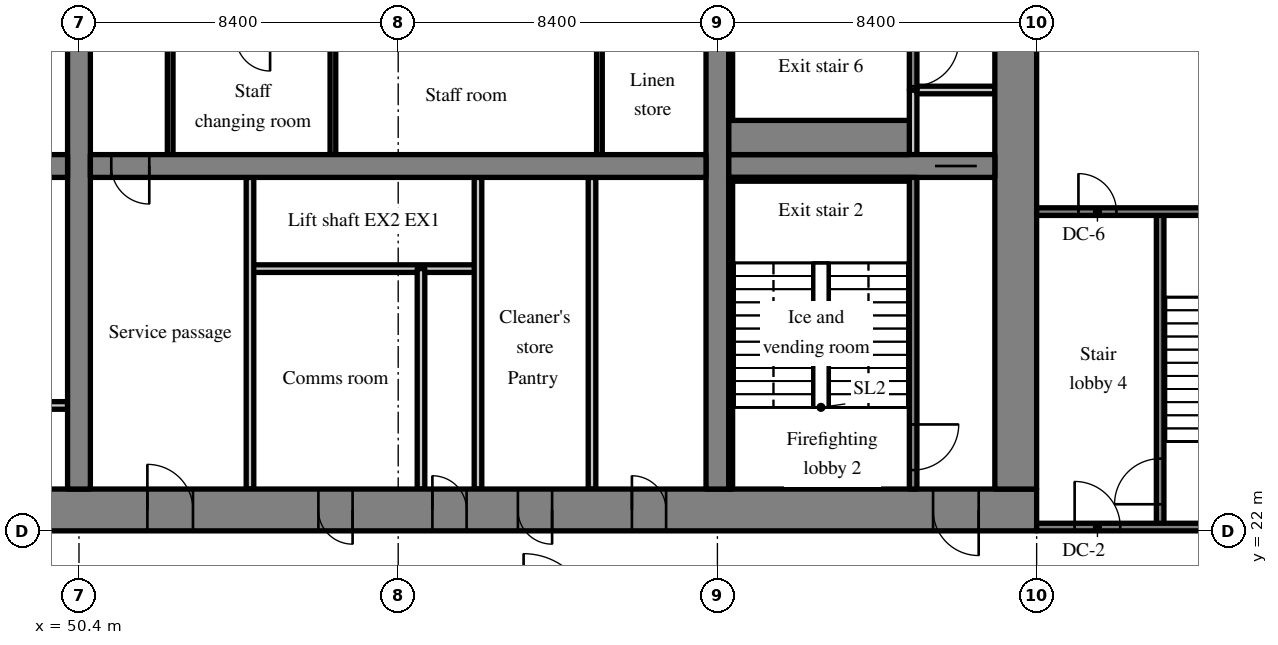
"""IFC4 building model, lengths in metres.
Left out: names, types, materials, properties, quantities, classifications, styles, units other than length and angle.
Written with IfcOpenShell. Run it as: python <this file> out.ifc"""

import sys

from ifc_helpers import new_model, si_unit, direction, frame, frame_2d, origin, place, context, subcontext, project, spatial, rectangle, extrude, source, transform, mapped, element, fill, save


model = new_model("IFC4")
c1 = context("Model", 3, precision=1e-05, world=origin(), true_north=direction((0.0, 1.0)))
c2 = subcontext(c1, "Body", "Model", "MODEL_VIEW")
j1 = project(units=[si_unit("LENGTHUNIT", "METRE"), si_unit("PLANEANGLEUNIT", "RADIAN")], contexts=[c1])
p1 = place(None, origin())
s1 = spatial("IfcSite", under=j1, at=p1, CompositionType="ELEMENT")
p2 = place(p1, origin())
s2 = spatial("IfcBuilding", under=s1, at=p2, CompositionType="ELEMENT")
p3 = place(p2, frame((0.0, 0.0, 11.4)))
s3 = spatial("IfcBuildingStorey", under=s2, at=p3, CompositionType="ELEMENT", Elevation=11.4)
m1 = source(origin(), c2, "Body", "SweptSolid", [
    extrude(rectangle(XDim=50.4, YDim=1.1, at=frame_2d((25.2, 0.0))), origin(), (0.0, 0.0, 1.0), 6.32),
])
p4 = place(p3, frame((25.2, 22.55, 0.0), z_axis=(0.0, 0.0, 1.0), x_axis=(1.0, 0.0, 0.0)))
e1 = element("IfcWall", 1, at=p4, inside=s3, PredefinedType="SHEAR", context=c2, shape_type="MappedRepresentation", body=[
    mapped(m1, transform((0.0, 0.0, 0.0), scale=1.0)),
])
m2 = source(origin(), c2, "Body", "SweptSolid", [
    extrude(rectangle(XDim=1.8, YDim=2.1, at=frame_2d((0.9, 1.05))), frame((0.0, 0.56, 0.0), z_axis=(0.0, -1.0, 0.0), x_axis=(1.0, 0.0, 0.0)), (0.0, 0.0, 1.0), 1.12),
])
p5 = place(p4, frame((15.9, 0.0, 0.0)))
e2 = element("IfcOpeningElement", 2, at=p5, cuts=e1, PredefinedType="OPENING", context=c2, shape_type="MappedRepresentation", body=[
    mapped(m2, transform((0.0, 0.0, 0.0), scale=1.0)),
])
m3 = source(origin(), c2, "Body", "SweptSolid", [
    extrude(rectangle(XDim=1.2, YDim=2.1, at=frame_2d((0.6, 1.05))), frame((0.0, 0.56, 0.0), z_axis=(0.0, -1.0, 0.0), x_axis=(1.0, 0.0, 0.0)), (0.0, 0.0, 1.0), 1.12),
])
p6 = place(p4, frame((27.0, 0.0, 0.0)))
e3 = element("IfcOpeningElement", 3, at=p6, cuts=e1, PredefinedType="OPENING", context=c2, shape_type="MappedRepresentation", body=[
    mapped(m3, transform((0.0, 0.0, 0.0), scale=1.0)),
])
m4 = source(origin(), c2, "Body", "SweptSolid", [
    extrude(rectangle(XDim=0.9, YDim=2.1, at=frame_2d((0.45, 1.05))), frame((0.0, 0.56, 0.0), z_axis=(0.0, -1.0, 0.0), x_axis=(1.0, 0.0, 0.0)), (0.0, 0.0, 1.0), 1.12),
])
p7 = place(p4, frame((34.5, 0.0, 0.0)))
e4 = element("IfcOpeningElement", 4, at=p7, cuts=e1, PredefinedType="OPENING", context=c2, shape_type="MappedRepresentation", body=[
    mapped(m4, transform((0.0, 0.0, 0.0), scale=1.0)),
])
p8 = place(p4, frame((31.5, 0.0, 0.0)))
e5 = element("IfcOpeningElement", 5, at=p8, cuts=e1, PredefinedType="OPENING", context=c2, shape_type="MappedRepresentation", body=[
    mapped(m4, transform((0.0, 0.0, 0.0), scale=1.0)),
])
p9 = place(p4, frame((39.75, 0.0, 0.0)))
e6 = element("IfcOpeningElement", 6, at=p9, cuts=e1, PredefinedType="OPENING", context=c2, shape_type="MappedRepresentation", body=[
    mapped(m4, transform((0.0, 0.0, 0.0), scale=1.0)),
])
p10 = place(p4, frame((36.75, 0.0, 0.0)))
e7 = element("IfcOpeningElement", 7, at=p10, cuts=e1, PredefinedType="OPENING", context=c2, shape_type="MappedRepresentation", body=[
    mapped(m4, transform((0.0, 0.0, 0.0), scale=1.0)),
])
p11 = place(p4, frame((6.425, 0.0, 0.0)))
e8 = element("IfcOpeningElement", 8, at=p11, cuts=e1, PredefinedType="OPENING", context=c2, shape_type="MappedRepresentation", body=[
    mapped(m3, transform((0.0, 0.0, 0.0), scale=1.0)),
])
p12 = place(p4, frame((47.675, 0.0, 0.0)))
e9 = element("IfcOpeningElement", 9, at=p12, cuts=e1, PredefinedType="OPENING", context=c2, shape_type="MappedRepresentation", body=[
    mapped(m3, transform((0.0, 0.0, 0.0), scale=1.0)),
])
m5 = source(origin(), c2, "Body", "SweptSolid", [
    extrude(rectangle(XDim=17.8, YDim=1.1, at=frame_2d((8.9, 0.0))), origin(), (0.0, 0.0, 1.0), 6.32),
])
p13 = place(p3, frame((75.05, 23.1, 0.0), z_axis=(0.0, 0.0, 1.0), x_axis=(0.0, 1.0, 0.0)))
e10 = element("IfcWall", 10, at=p13, inside=s3, PredefinedType="SHEAR", context=c2, shape_type="MappedRepresentation", body=[
    mapped(m5, transform((0.0, 0.0, 0.0), scale=1.0)),
])
p14 = place(p13, frame((12.3, 0.0, 0.0)))
e11 = element("IfcOpeningElement", 11, at=p14, cuts=e10, PredefinedType="OPENING", context=c2, shape_type="MappedRepresentation", body=[
    mapped(m3, transform((0.0, 0.0, 0.0), scale=1.0)),
])
m6 = source(origin(), c2, "Body", "SweptSolid", [
    extrude(rectangle(XDim=17.8, YDim=0.6, at=frame_2d((8.9, 0.0))), origin(), (0.0, 0.0, 1.0), 6.32),
])
p15 = place(p3, frame((50.4, 23.1, 0.0), z_axis=(0.0, 0.0, 1.0), x_axis=(0.0, 1.0, 0.0)))
e12 = element("IfcWall", 12, at=p15, inside=s3, PredefinedType="SHEAR", context=c2, shape_type="MappedRepresentation", body=[
    mapped(m6, transform((0.0, 0.0, 0.0), scale=1.0)),
])
m7 = source(origin(), c2, "Body", "SweptSolid", [
    extrude(rectangle(XDim=1.1, YDim=2.1, at=frame_2d((0.55, 1.05))), frame((0.0, 0.31, 0.0), z_axis=(0.0, -1.0, 0.0), x_axis=(1.0, 0.0, 0.0)), (0.0, 0.0, 1.0), 0.62),
])
p16 = place(p15, frame((12.35, 0.0, 0.0)))
e13 = element("IfcOpeningElement", 13, at=p16, cuts=e12, PredefinedType="OPENING", context=c2, shape_type="MappedRepresentation", body=[
    mapped(m7, transform((0.0, 0.0, 0.0), scale=1.0)),
])
p17 = place(p3, frame((67.2, 23.1, 0.0), z_axis=(0.0, 0.0, 1.0), x_axis=(0.0, 1.0, 0.0)))
e14 = element("IfcWall", 14, at=p17, inside=s3, PredefinedType="SHEAR", context=c2, shape_type="MappedRepresentation", body=[
    mapped(m6, transform((0.0, 0.0, 0.0), scale=1.0)),
])
m8 = source(origin(), c2, "Body", "SweptSolid", [
    extrude(rectangle(XDim=16.2, YDim=0.6, at=frame_2d((8.1, 0.0))), origin(), (0.0, 0.0, 1.0), 6.32),
])
p18 = place(p3, frame((33.9, 31.6, 0.0), z_axis=(0.0, 0.0, 1.0), x_axis=(1.0, 0.0, 0.0)))
e15 = element("IfcWall", 15, at=p18, inside=s3, PredefinedType="SHEAR", context=c2, shape_type="MappedRepresentation", body=[
    mapped(m8, transform((0.0, 0.0, 0.0), scale=1.0)),
])
m9 = source(origin(), c2, "Body", "SweptSolid", [
    extrude(rectangle(XDim=1.0, YDim=2.1, at=frame_2d((0.5, 1.05))), frame((0.0, 0.31, 0.0), z_axis=(0.0, -1.0, 0.0), x_axis=(1.0, 0.0, 0.0)), (0.0, 0.0, 1.0), 0.62),
])
p19 = place(p18, frame((14.65, 0.0, 0.0)))
e16 = element("IfcOpeningElement", 16, at=p19, cuts=e15, PredefinedType="OPENING", context=c2, shape_type="MappedRepresentation", body=[
    mapped(m9, transform((0.0, 0.0, 0.0), scale=1.0)),
])
m10 = source(origin(), c2, "Body", "SweptSolid", [
    extrude(rectangle(XDim=16.2, YDim=0.6, at=frame_2d((8.1, 0.0))), origin(), (0.0, 0.0, 1.0), 6.32),
])
p20 = place(p3, frame((50.7, 31.6, 0.0), z_axis=(0.0, 0.0, 1.0), x_axis=(1.0, 0.0, 0.0)))
e17 = element("IfcWall", 17, at=p20, inside=s3, PredefinedType="SHEAR", context=c2, shape_type="MappedRepresentation", body=[
    mapped(m10, transform((0.0, 0.0, 0.0), scale=1.0)),
])
p21 = place(p20, frame((0.55, 0.0, 0.0)))
e18 = element("IfcOpeningElement", 18, at=p21, cuts=e17, PredefinedType="OPENING", context=c2, shape_type="MappedRepresentation", body=[
    mapped(m9, transform((0.0, 0.0, 0.0), scale=1.0)),
])
m11 = source(origin(), c2, "Body", "SweptSolid", [
    extrude(rectangle(XDim=7.0, YDim=0.6, at=frame_2d((3.5, 0.0))), origin(), (0.0, 0.0, 1.0), 6.32),
])
p22 = place(p3, frame((67.5, 31.6, 0.0), z_axis=(0.0, 0.0, 1.0), x_axis=(1.0, 0.0, 0.0)))
e19 = element("IfcWall", 19, at=p22, inside=s3, PredefinedType="SHEAR", context=c2, shape_type="MappedRepresentation", body=[
    mapped(m11, transform((0.0, 0.0, 0.0), scale=1.0)),
])
p23 = place(p22, frame((5.425, 0.0, 0.0)))
e20 = element("IfcOpeningElement", 20, at=p23, cuts=e19, PredefinedType="OPENING", context=c2, shape_type="MappedRepresentation", body=[
    mapped(m7, transform((0.0, 0.0, 0.0), scale=1.0)),
])
m12 = source(origin(), c2, "Body", "SweptSolid", [
    extrude(rectangle(XDim=6.0, YDim=0.2, at=frame_2d((3.0, 0.0))), origin(), (0.0, 0.0, 1.0), 6.32),
])
p24 = place(p3, frame((44.1, 25.3, 0.0), z_axis=(0.0, 0.0, 1.0), x_axis=(1.0, 0.0, 0.0)))
e21 = element("IfcWall", 21, at=p24, inside=s3, PredefinedType="SOLIDWALL", context=c2, shape_type="MappedRepresentation", body=[
    mapped(m12, transform((0.0, 0.0, 0.0), scale=1.0)),
])
m13 = source(origin(), c2, "Body", "SweptSolid", [
    extrude(rectangle(XDim=1.1, YDim=2.1, at=frame_2d((0.55, 1.05))), frame((0.0, 0.11, 0.0), z_axis=(0.0, -1.0, 0.0), x_axis=(1.0, 0.0, 0.0)), (0.0, 0.0, 1.0), 0.22),
])
p25 = place(p24, frame((0.95, 0.0, 0.0)))
e22 = element("IfcOpeningElement", 22, at=p25, cuts=e21, PredefinedType="OPENING", context=c2, shape_type="MappedRepresentation", body=[
    mapped(m13, transform((0.0, 0.0, 0.0), scale=1.0)),
])
p26 = place(p24, frame((3.95, 0.0, 0.0)))
e23 = element("IfcOpeningElement", 23, at=p26, cuts=e21, PredefinedType="OPENING", context=c2, shape_type="MappedRepresentation", body=[
    mapped(m13, transform((0.0, 0.0, 0.0), scale=1.0)),
])
p27 = place(p3, frame((60.9, 28.9, 0.0), z_axis=(0.0, 0.0, 1.0), x_axis=(-1.0, 0.0, 0.0)))
e24 = element("IfcWall", 24, at=p27, inside=s3, PredefinedType="SOLIDWALL", context=c2, shape_type="MappedRepresentation", body=[
    mapped(m12, transform((0.0, 0.0, 0.0), scale=1.0)),
])
m14 = source(origin(), c2, "Body", "SweptSolid", [
    extrude(rectangle(XDim=8.2, YDim=0.2, at=frame_2d((4.1, 0.0))), origin(), (0.0, 0.0, 1.0), 6.32),
])
for number, where, z_axis, x_axis in (
    (25, (54.9, 23.1, 0.0), (0.0, 0.0, 1.0), (0.0, 1.0, 0.0)),
    (26, (60.9, 23.1, 0.0), (0.0, 0.0, 1.0), (0.0, 1.0, 0.0)),
):
    element("IfcWall", number, at=place(p3, frame(where, z_axis=z_axis, x_axis=x_axis)), inside=s3, PredefinedType="PARTITIONING", context=c2, shape_type="MappedRepresentation", body=[
        mapped(m14, transform((0.0, 0.0, 0.0), scale=1.0)),
    ])
m15 = source(origin(), c2, "Body", "SweptSolid", [
    extrude(rectangle(XDim=5.8, YDim=0.2, at=frame_2d((2.9, 0.0))), origin(), (0.0, 0.0, 1.0), 6.32),
])
p28 = place(p3, frame((59.4, 23.1, 0.0), z_axis=(0.0, 0.0, 1.0), x_axis=(0.0, 1.0, 0.0)))
e27 = element("IfcWall", 27, at=p28, inside=s3, PredefinedType="PARTITIONING", context=c2, shape_type="MappedRepresentation", body=[
    mapped(m15, transform((0.0, 0.0, 0.0), scale=1.0)),
])
p29 = place(p3, frame((63.9, 23.1, 0.0), z_axis=(0.0, 0.0, 1.0), x_axis=(0.0, 1.0, 0.0)))
e28 = element("IfcWall", 28, at=p29, inside=s3, PredefinedType="PARTITIONING", context=c2, shape_type="MappedRepresentation", body=[
    mapped(m14, transform((0.0, 0.0, 0.0), scale=1.0)),
])
m16 = source(origin(), c2, "Body", "SweptSolid", [
    extrude(rectangle(XDim=3.1, YDim=0.15, at=frame_2d((1.55, 0.0))), origin(), (0.0, 0.0, 1.0), 6.32),
])
for number, where, z_axis, x_axis in (
    (29, (52.8, 31.9, 0.0), (0.0, 0.0, 1.0), (0.0, 1.0, 0.0)),
    (30, (64.095, 31.9, 0.0), (0.0, 0.0, 1.0), (0.0, 1.0, 0.0)),
    (31, (57.082, 31.9, 0.0), (0.0, 0.0, 1.0), (0.0, 1.0, 0.0)),
):
    element("IfcWall", number, at=place(p3, frame(where, z_axis=z_axis, x_axis=x_axis)), inside=s3, PredefinedType="PARTITIONING", context=c2, shape_type="MappedRepresentation", body=[
        mapped(m16, transform((0.0, 0.0, 0.0), scale=1.0)),
    ])
m17 = source(origin(), c2, "Body", "SweptSolid", [
    extrude(rectangle(XDim=8.2, YDim=0.2, at=frame_2d((4.1, 0.0))), origin(), (0.0, 0.0, 1.0), 6.32),
])
p30 = place(p3, frame((72.35, 23.1, 0.0), z_axis=(0.0, 0.0, 1.0), x_axis=(0.0, 1.0, 0.0)))
e32 = element("IfcWall", 32, at=p30, inside=s3, PredefinedType="SOLIDWALL", context=c2, shape_type="MappedRepresentation", body=[
    mapped(m17, transform((0.0, 0.0, 0.0), scale=1.0)),
])
m18 = source(origin(), c2, "Body", "SweptSolid", [
    extrude(rectangle(XDim=1.2, YDim=2.1, at=frame_2d((0.6, 1.05))), frame((0.0, 0.11, 0.0), z_axis=(0.0, -1.0, 0.0), x_axis=(1.0, 0.0, 0.0)), (0.0, 0.0, 1.0), 0.22),
])
p31 = place(p30, frame((0.5, 0.0, 0.0)))
e33 = element("IfcOpeningElement", 33, at=p31, cuts=e32, PredefinedType="OPENING", context=c2, shape_type="MappedRepresentation", body=[
    mapped(m18, transform((0.0, 0.0, 0.0), scale=1.0)),
])
m19 = source(origin(), c2, "Body", "SweptSolid", [
    extrude(rectangle(XDim=1.7, YDim=0.2, at=frame_2d((0.85, 0.0))), origin(), (0.0, 0.0, 1.0), 6.32),
])
p32 = place(p3, frame((72.35, 31.9, 0.0), z_axis=(0.0, 0.0, 1.0), x_axis=(0.0, 1.0, 0.0)))
e34 = element("IfcWall", 34, at=p32, inside=s3, PredefinedType="SOLIDWALL", context=c2, shape_type="MappedRepresentation", body=[
    mapped(m19, transform((0.0, 0.0, 0.0), scale=1.0)),
])
m20 = source(origin(), c2, "Body", "SweptSolid", [
    extrude(rectangle(XDim=2.05, YDim=0.2, at=frame_2d((1.025, 0.0))), origin(), (0.0, 0.0, 1.0), 6.32),
])
p33 = place(p3, frame((72.45, 33.6, 0.0), z_axis=(0.0, 0.0, 1.0), x_axis=(1.0, 0.0, 0.0)))
e35 = element("IfcWall", 35, at=p33, inside=s3, PredefinedType="SOLIDWALL", context=c2, shape_type="MappedRepresentation", body=[
    mapped(m20, transform((0.0, 0.0, 0.0), scale=1.0)),
])
m21 = source(origin(), c2, "Body", "SweptSolid", [
    extrude(rectangle(XDim=7.3, YDim=0.2, at=frame_2d((3.65, 0.0))), origin(), (0.0, 0.0, 1.0), 6.32),
])
p34 = place(p3, frame((72.35, 33.6, 0.0), z_axis=(0.0, 0.0, 1.0), x_axis=(0.0, 1.0, 0.0)))
e36 = element("IfcWall", 36, at=p34, inside=s3, PredefinedType="SOLIDWALL", context=c2, shape_type="MappedRepresentation", body=[
    mapped(m21, transform((0.0, 0.0, 0.0), scale=1.0)),
])
p35 = place(p34, frame((0.1, 0.0, 0.0)))
e37 = element("IfcOpeningElement", 37, at=p35, cuts=e36, PredefinedType="OPENING", context=c2, shape_type="MappedRepresentation", body=[
    mapped(m18, transform((0.0, 0.0, 0.0), scale=1.0)),
])
m22 = source(origin(), c2, "Body", "SweptSolid", [
    extrude(rectangle(XDim=8.3, YDim=0.2, at=frame_2d((4.15, 0.0))), origin(), (0.0, 0.0, 1.0), 6.32),
])
p36 = place(p3, frame((78.85, 22.1, 0.0), z_axis=(0.0, 0.0, 1.0), x_axis=(0.0, 1.0, 0.0)))
e38 = element("IfcWall", 38, at=p36, inside=s3, PredefinedType="SOLIDWALL", context=c2, shape_type="MappedRepresentation", body=[
    mapped(m22, transform((0.0, 0.0, 0.0), scale=1.0)),
])
p37 = place(p36, frame((0.6, 0.0, 0.0)))
e39 = element("IfcOpeningElement", 39, at=p37, cuts=e38, PredefinedType="OPENING", context=c2, shape_type="MappedRepresentation", body=[
    mapped(m18, transform((0.0, 0.0, 0.0), scale=1.0)),
])
m23 = source(origin(), c2, "Body", "SweptSolid", [
    extrude(rectangle(XDim=8.175, YDim=0.2, at=frame_2d((4.087, 0.0))), origin(), (0.0, 0.0, 1.0), 6.32),
])
p38 = place(p3, frame((83.775, 22.1, 0.0), z_axis=(0.0, 0.0, 1.0), x_axis=(-1.0, 0.0, 0.0)))
e40 = element("IfcWall", 40, at=p38, inside=s3, PredefinedType="SOLIDWALL", context=c2, shape_type="MappedRepresentation", body=[
    mapped(m23, transform((0.0, 0.0, 0.0), scale=1.0)),
])
p39 = place(p38, frame((5.975, 0.0, 0.0)))
e41 = element("IfcOpeningElement", 41, at=p39, cuts=e40, PredefinedType="OPENING", context=c2, shape_type="MappedRepresentation", body=[
    mapped(m18, transform((0.0, 0.0, 0.0), scale=1.0)),
])
p40 = place(p3, frame((83.775, 30.4, 0.0), z_axis=(0.0, 0.0, 1.0), x_axis=(-1.0, 0.0, 0.0)))
e42 = element("IfcWall", 42, at=p40, inside=s3, PredefinedType="SOLIDWALL", context=c2, shape_type="MappedRepresentation", body=[
    mapped(m23, transform((0.0, 0.0, 0.0), scale=1.0)),
])
m24 = source(origin(), c2, "Body", "SweptSolid", [
    extrude(rectangle(XDim=1.0, YDim=2.1, at=frame_2d((0.5, 1.05))), frame((0.0, 0.11, 0.0), z_axis=(0.0, -1.0, 0.0), x_axis=(1.0, 0.0, 0.0)), (0.0, 0.0, 1.0), 0.22),
])
p41 = place(p40, frame((6.075, 0.0, 0.0)))
e43 = element("IfcOpeningElement", 43, at=p41, cuts=e42, PredefinedType="OPENING", context=c2, shape_type="MappedRepresentation", body=[
    mapped(m24, transform((0.0, 0.0, 0.0), scale=1.0)),
])
m25 = source(origin(), c2, "Body", "SweptSolid", [
    extrude(rectangle(XDim=4.75, YDim=0.1, at=frame_2d((2.375, 0.0))), origin(), (0.0, 0.0, 1.0), 6.32),
])
p42 = place(p3, frame((67.5, 31.25, 0.0), z_axis=(0.0, 0.0, 1.0), x_axis=(1.0, 0.0, 0.0)))
e44 = element("IfcWall", 44, at=p42, inside=s3, PredefinedType="SOLIDWALL", context=c2, shape_type="MappedRepresentation", body=[
    mapped(m25, transform((0.0, 0.0, 0.0), scale=1.0)),
])
m26 = source(origin(), c2, "Body", "SweptSolid", [
    extrude(rectangle(XDim=8.1, YDim=0.1, at=frame_2d((4.05, 0.0))), origin(), (0.0, 0.0, 1.0), 6.32),
])
p43 = place(p3, frame((67.55, 23.1, 0.0), z_axis=(0.0, 0.0, 1.0), x_axis=(0.0, 1.0, 0.0)))
e45 = element("IfcWall", 45, at=p43, inside=s3, PredefinedType="SOLIDWALL", context=c2, shape_type="MappedRepresentation", body=[
    mapped(m26, transform((0.0, 0.0, 0.0), scale=1.0)),
])
m27 = source(origin(), c2, "Body", "SweptSolid", [
    extrude(rectangle(XDim=4.75, YDim=0.9, at=frame_2d((2.375, 0.0))), origin(), (0.0, 0.0, 1.0), 6.32),
])
p44 = place(p3, frame((67.5, 32.35, 0.0), z_axis=(0.0, 0.0, 1.0), x_axis=(1.0, 0.0, 0.0)))
e46 = element("IfcWall", 46, at=p44, inside=s3, PredefinedType="SOLIDWALL", context=c2, shape_type="MappedRepresentation", body=[
    mapped(m27, transform((0.0, 0.0, 0.0), scale=1.0)),
])
p45 = place(p3, frame((67.55, 32.8, 0.0), z_axis=(0.0, 0.0, 1.0), x_axis=(0.0, 1.0, 0.0)))
e47 = element("IfcWall", 47, at=p45, inside=s3, PredefinedType="SOLIDWALL", context=c2, shape_type="MappedRepresentation", body=[
    mapped(m26, transform((0.0, 0.0, 0.0), scale=1.0)),
])
m28 = source(origin(), c2, "Body", "SweptSolid", [
    extrude(rectangle(XDim=1.2, YDim=2.1, at=frame_2d((0.6, 1.05))), frame((0.0, 0.325, 0.0), z_axis=(0.0, -1.0, 0.0), x_axis=(1.0, 0.0, 0.0)), (0.0, 0.0, 1.0), 0.05),
])
p46 = place(p6, origin())
e48 = element("IfcDoor", 48, at=p46, inside=s3, OperationType="SINGLE_SWING_LEFT", PredefinedType="DOOR", context=c2, shape_type="MappedRepresentation", body=[
    mapped(m28, transform((0.0, 0.0, 0.0), scale=1.0)),
])
fill(e3, e48)
m29 = source(origin(), c2, "Body", "SweptSolid", [
    extrude(rectangle(XDim=1.0, YDim=2.1, at=frame_2d((0.5, 1.05))), frame((0.0, 0.025, 0.0), z_axis=(0.0, -1.0, 0.0), x_axis=(1.0, 0.0, 0.0)), (0.0, 0.0, 1.0), 0.05),
])
p47 = place(p21, origin())
e49 = element("IfcDoor", 49, at=p47, inside=s3, OperationType="SINGLE_SWING_RIGHT", PredefinedType="DOOR", context=c2, shape_type="MappedRepresentation", body=[
    mapped(m29, transform((0.0, 0.0, 0.0), scale=1.0)),
])
fill(e18, e49)
m30 = source(origin(), c2, "Body", "SweptSolid", [
    extrude(rectangle(XDim=0.9, YDim=2.1, at=frame_2d((0.45, 1.05))), frame((0.0, 0.325, 0.0), z_axis=(0.0, -1.0, 0.0), x_axis=(1.0, 0.0, 0.0)), (0.0, 0.0, 1.0), 0.05),
])
p48 = place(p7, origin())
e50 = element("IfcDoor", 50, at=p48, inside=s3, OperationType="SINGLE_SWING_LEFT", PredefinedType="DOOR", context=c2, shape_type="MappedRepresentation", body=[
    mapped(m30, transform((0.0, 0.0, 0.0), scale=1.0)),
])
fill(e4, e50)
p49 = place(p8, origin())
e51 = element("IfcDoor", 51, at=p49, inside=s3, OperationType="SINGLE_SWING_RIGHT", PredefinedType="DOOR", context=c2, shape_type="MappedRepresentation", body=[
    mapped(m30, transform((0.0, 0.0, 0.0), scale=1.0)),
])
fill(e5, e51)
p50 = place(p9, origin())
e52 = element("IfcDoor", 52, at=p50, inside=s3, OperationType="SINGLE_SWING_LEFT", PredefinedType="DOOR", context=c2, shape_type="MappedRepresentation", body=[
    mapped(m30, transform((0.0, 0.0, 0.0), scale=1.0)),
])
fill(e6, e52)
p51 = place(p10, origin())
e53 = element("IfcDoor", 53, at=p51, inside=s3, OperationType="SINGLE_SWING_RIGHT", PredefinedType="DOOR", context=c2, shape_type="MappedRepresentation", body=[
    mapped(m30, transform((0.0, 0.0, 0.0), scale=1.0)),
])
fill(e7, e53)
m31 = source(origin(), c2, "Body", "SweptSolid", [
    extrude(rectangle(XDim=1.2, YDim=2.1, at=frame_2d((0.6, 1.05))), frame((0.0, 0.025, 0.0), z_axis=(0.0, -1.0, 0.0), x_axis=(1.0, 0.0, 0.0)), (0.0, 0.0, 1.0), 0.05),
])
p52 = place(p31, origin())
e54 = element("IfcDoor", 54, at=p52, inside=s3, OperationType="SINGLE_SWING_RIGHT", PredefinedType="DOOR", context=c2, shape_type="MappedRepresentation", body=[
    mapped(m31, transform((0.0, 0.0, 0.0), scale=1.0)),
])
fill(e33, e54)
p53 = place(p12, origin())
e55 = element("IfcDoor", 55, at=p53, inside=s3, OperationType="SINGLE_SWING_RIGHT", PredefinedType="DOOR", context=c2, shape_type="MappedRepresentation", body=[
    mapped(m28, transform((0.0, 0.0, 0.0), scale=1.0)),
])
fill(e9, e55)
m32 = source(origin(), c2, "Body", "SweptSolid", [
    extrude(rectangle(XDim=1.1, YDim=2.1, at=frame_2d((0.55, 1.05))), frame((0.0, 0.025, 0.0), z_axis=(0.0, -1.0, 0.0), x_axis=(1.0, 0.0, 0.0)), (0.0, 0.0, 1.0), 0.05),
])
p54 = place(p23, origin())
e56 = element("IfcDoor", 56, at=p54, inside=s3, OperationType="SLIDING_TO_RIGHT", PredefinedType="DOOR", context=c2, shape_type="MappedRepresentation", body=[
    mapped(m32, transform((0.0, 0.0, 0.0), scale=1.0)),
])
fill(e20, e56)
p55 = place(p35, origin())
e57 = element("IfcDoor", 57, at=p55, inside=s3, OperationType="SINGLE_SWING_RIGHT", PredefinedType="DOOR", context=c2, shape_type="MappedRepresentation", body=[
    mapped(m31, transform((0.0, 0.0, 0.0), scale=1.0)),
])
fill(e37, e57)
p56 = place(p37, origin())
e58 = element("IfcDoor", 58, at=p56, inside=s3, OperationType="SINGLE_SWING_LEFT", PredefinedType="DOOR", context=c2, shape_type="MappedRepresentation", body=[
    mapped(m31, transform((0.0, 0.0, 0.0), scale=1.0)),
])
fill(e39, e58)
p57 = place(p39, origin())
e59 = element("IfcDoor", 59, at=p57, inside=s3, OperationType="SINGLE_SWING_RIGHT", PredefinedType="DOOR", context=c2, shape_type="MappedRepresentation", body=[
    mapped(m31, transform((0.0, 0.0, 0.0), scale=1.0)),
])
fill(e41, e59)
p58 = place(p41, origin())
e60 = element("IfcDoor", 60, at=p58, inside=s3, OperationType="SINGLE_SWING_RIGHT", PredefinedType="DOOR", context=c2, shape_type="MappedRepresentation", body=[
    mapped(m29, transform((0.0, 0.0, 0.0), scale=1.0)),
])
fill(e43, e60)
save(model, sys.argv[1])
